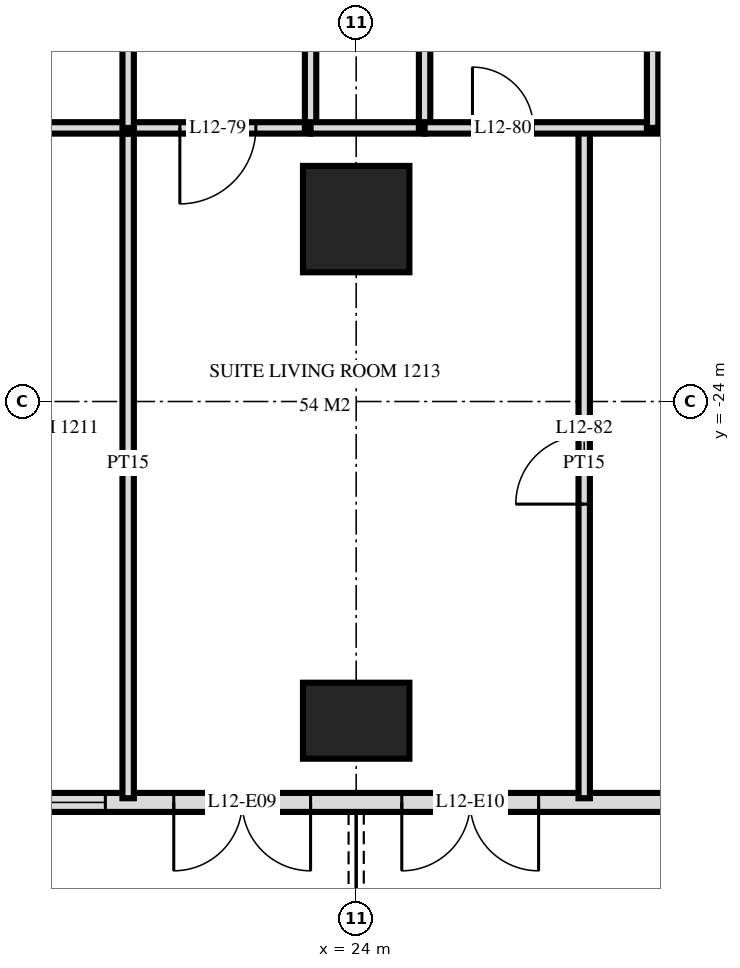
"""IFC4 building model, lengths in metres.
Left out: names, types, materials, properties, quantities, classifications, styles, units other than length and angle.
Written with IfcOpenShell. Run it as: python <this file> out.ifc"""

import sys

from ifc_helpers import new_model, si_unit, direction, frame, frame_2d, origin, origin_2d, place, context, subcontext, project, spatial, rectangle, extrude, element, fill, save


model = new_model("IFC4")
c1 = context("Model", 3, precision=1e-05, world=origin(), true_north=direction((0.0, 1.0)))
c2 = subcontext(c1, "Body", "Model", "MODEL_VIEW")
j1 = project(units=[si_unit("LENGTHUNIT", "METRE"), si_unit("PLANEANGLEUNIT", "RADIAN")], contexts=[c1])
p1 = place(None, origin())
s1 = spatial("IfcSite", under=j1, at=p1, CompositionType="ELEMENT")
p2 = place(p1, origin())
s2 = spatial("IfcBuilding", under=s1, at=p2, CompositionType="ELEMENT")
p3 = place(p2, frame((0.0, 0.0, 52.8)))
s3 = spatial("IfcBuildingStorey", under=s2, at=p3, CompositionType="ELEMENT", Elevation=52.8)
p4 = place(p3, frame((24.0, -28.2, 0.0), z_axis=(0.0, 0.0, 1.0), x_axis=(1.0, 0.0, 0.0)))
e1 = element("IfcColumn", 1, at=p4, inside=s3, PredefinedType="COLUMN", context=c2, shape_type="SweptSolid", body=[
    extrude(rectangle(XDim=1.4, YDim=1.0, at=origin_2d()), origin(), (0.0, 0.0, 1.0), 3.6),
])
p5 = place(p3, frame((24.0, -21.6, 0.0), z_axis=(0.0, 0.0, 1.0), x_axis=(1.0, 0.0, 0.0)))
e2 = element("IfcColumn", 2, at=p5, inside=s3, PredefinedType="COLUMN", context=c2, shape_type="SweptSolid", body=[
    extrude(rectangle(XDim=1.4, YDim=1.4, at=origin_2d()), origin(), (0.0, 0.0, 1.0), 3.6),
])
p6 = place(p3, frame((-28.775, -29.275, 0.0), z_axis=(0.0, 0.0, 1.0), x_axis=(1.0, 0.0, 0.0)))
e3 = element("IfcWall", 3, at=p6, inside=s3, PredefinedType="SOLIDWALL", context=c2, shape_type="SweptSolid", body=[
    extrude(rectangle(XDim=57.551, YDim=0.25, at=frame_2d((28.775, 0.0))), origin(), (0.0, 0.0, 1.0), 3.32),
])
p7 = place(p6, frame((0.575, 0.0, 0.0)))
e4 = element("IfcOpeningElement", 4, at=p7, cuts=e3, PredefinedType="OPENING", context=c2, shape_type="SweptSolid", body=[
    extrude(rectangle(XDim=1.8, YDim=2.4, at=frame_2d((0.9, 1.2))), frame((0.0, 0.135, 0.0), z_axis=(0.0, -1.0, 0.0), x_axis=(1.0, 0.0, 0.0)), (0.0, 0.0, 1.0), 0.27),
])
p8 = place(p6, frame((5.375, 0.0, 0.0)))
e5 = element("IfcOpeningElement", 5, at=p8, cuts=e3, PredefinedType="OPENING", context=c2, shape_type="SweptSolid", body=[
    extrude(rectangle(XDim=1.8, YDim=2.4, at=frame_2d((0.9, 1.2))), frame((0.0, 0.135, 0.0), z_axis=(0.0, -1.0, 0.0), x_axis=(1.0, 0.0, 0.0)), (0.0, 0.0, 1.0), 0.27),
])
p9 = place(p6, frame((8.075, 0.0, 0.3)))
e6 = element("IfcOpeningElement", 6, at=p9, cuts=e3, PredefinedType="OPENING", context=c2, shape_type="SweptSolid", body=[
    extrude(rectangle(XDim=2.4, YDim=2.1, at=frame_2d((1.2, 1.05))), frame((0.0, 0.135, 0.0), z_axis=(0.0, -1.0, 0.0), x_axis=(1.0, 0.0, 0.0)), (0.0, 0.0, 1.0), 0.27),
])
p10 = place(p6, frame((11.375, 0.0, 0.0)))
e7 = element("IfcOpeningElement", 7, at=p10, cuts=e3, PredefinedType="OPENING", context=c2, shape_type="SweptSolid", body=[
    extrude(rectangle(XDim=1.8, YDim=2.4, at=frame_2d((0.9, 1.2))), frame((0.0, 0.135, 0.0), z_axis=(0.0, -1.0, 0.0), x_axis=(1.0, 0.0, 0.0)), (0.0, 0.0, 1.0), 0.27),
])
p11 = place(p6, frame((14.075, 0.0, 0.3)))
e8 = element("IfcOpeningElement", 8, at=p11, cuts=e3, PredefinedType="OPENING", context=c2, shape_type="SweptSolid", body=[
    extrude(rectangle(XDim=2.4, YDim=2.1, at=frame_2d((1.2, 1.05))), frame((0.0, 0.135, 0.0), z_axis=(0.0, -1.0, 0.0), x_axis=(1.0, 0.0, 0.0)), (0.0, 0.0, 1.0), 0.27),
])
p12 = place(p6, frame((17.375, 0.0, 0.0)))
e9 = element("IfcOpeningElement", 9, at=p12, cuts=e3, PredefinedType="OPENING", context=c2, shape_type="SweptSolid", body=[
    extrude(rectangle(XDim=1.8, YDim=2.4, at=frame_2d((0.9, 1.2))), frame((0.0, 0.135, 0.0), z_axis=(0.0, -1.0, 0.0), x_axis=(1.0, 0.0, 0.0)), (0.0, 0.0, 1.0), 0.27),
])
p13 = place(p6, frame((20.075, 0.0, 0.3)))
e10 = element("IfcOpeningElement", 10, at=p13, cuts=e3, PredefinedType="OPENING", context=c2, shape_type="SweptSolid", body=[
    extrude(rectangle(XDim=2.4, YDim=2.1, at=frame_2d((1.2, 1.05))), frame((0.0, 0.135, 0.0), z_axis=(0.0, -1.0, 0.0), x_axis=(1.0, 0.0, 0.0)), (0.0, 0.0, 1.0), 0.27),
])
p14 = place(p6, frame((23.075, 0.0, 0.3)))
e11 = element("IfcOpeningElement", 11, at=p14, cuts=e3, PredefinedType="OPENING", context=c2, shape_type="SweptSolid", body=[
    extrude(rectangle(XDim=2.4, YDim=2.1, at=frame_2d((1.2, 1.05))), frame((0.0, 0.135, 0.0), z_axis=(0.0, -1.0, 0.0), x_axis=(1.0, 0.0, 0.0)), (0.0, 0.0, 1.0), 0.27),
])
p15 = place(p6, frame((26.375, 0.0, 0.0)))
e12 = element("IfcOpeningElement", 12, at=p15, cuts=e3, PredefinedType="OPENING", context=c2, shape_type="SweptSolid", body=[
    extrude(rectangle(XDim=1.8, YDim=2.4, at=frame_2d((0.9, 1.2))), frame((0.0, 0.135, 0.0), z_axis=(0.0, -1.0, 0.0), x_axis=(1.0, 0.0, 0.0)), (0.0, 0.0, 1.0), 0.27),
])
p16 = place(p6, frame((29.375, 0.0, 0.0)))
e13 = element("IfcOpeningElement", 13, at=p16, cuts=e3, PredefinedType="OPENING", context=c2, shape_type="SweptSolid", body=[
    extrude(rectangle(XDim=1.8, YDim=2.4, at=frame_2d((0.9, 1.2))), frame((0.0, 0.135, 0.0), z_axis=(0.0, -1.0, 0.0), x_axis=(1.0, 0.0, 0.0)), (0.0, 0.0, 1.0), 0.27),
])
p17 = place(p6, frame((32.075, 0.0, 0.3)))
e14 = element("IfcOpeningElement", 14, at=p17, cuts=e3, PredefinedType="OPENING", context=c2, shape_type="SweptSolid", body=[
    extrude(rectangle(XDim=2.4, YDim=2.1, at=frame_2d((1.2, 1.05))), frame((0.0, 0.135, 0.0), z_axis=(0.0, -1.0, 0.0), x_axis=(1.0, 0.0, 0.0)), (0.0, 0.0, 1.0), 0.27),
])
p18 = place(p6, frame((35.075, 0.0, 0.3)))
e15 = element("IfcOpeningElement", 15, at=p18, cuts=e3, PredefinedType="OPENING", context=c2, shape_type="SweptSolid", body=[
    extrude(rectangle(XDim=2.4, YDim=2.1, at=frame_2d((1.2, 1.05))), frame((0.0, 0.135, 0.0), z_axis=(0.0, -1.0, 0.0), x_axis=(1.0, 0.0, 0.0)), (0.0, 0.0, 1.0), 0.27),
])
p19 = place(p6, frame((38.375, 0.0, 0.0)))
e16 = element("IfcOpeningElement", 16, at=p19, cuts=e3, PredefinedType="OPENING", context=c2, shape_type="SweptSolid", body=[
    extrude(rectangle(XDim=1.8, YDim=2.4, at=frame_2d((0.9, 1.2))), frame((0.0, 0.135, 0.0), z_axis=(0.0, -1.0, 0.0), x_axis=(1.0, 0.0, 0.0)), (0.0, 0.0, 1.0), 0.27),
])
p20 = place(p6, frame((41.375, 0.0, 0.0)))
e17 = element("IfcOpeningElement", 17, at=p20, cuts=e3, PredefinedType="OPENING", context=c2, shape_type="SweptSolid", body=[
    extrude(rectangle(XDim=1.8, YDim=2.4, at=frame_2d((0.9, 1.2))), frame((0.0, 0.135, 0.0), z_axis=(0.0, -1.0, 0.0), x_axis=(1.0, 0.0, 0.0)), (0.0, 0.0, 1.0), 0.27),
])
p21 = place(p6, frame((44.075, 0.0, 0.3)))
e18 = element("IfcOpeningElement", 18, at=p21, cuts=e3, PredefinedType="OPENING", context=c2, shape_type="SweptSolid", body=[
    extrude(rectangle(XDim=2.4, YDim=2.1, at=frame_2d((1.2, 1.05))), frame((0.0, 0.135, 0.0), z_axis=(0.0, -1.0, 0.0), x_axis=(1.0, 0.0, 0.0)), (0.0, 0.0, 1.0), 0.27),
])
p22 = place(p6, frame((47.075, 0.0, 0.3)))
e19 = element("IfcOpeningElement", 19, at=p22, cuts=e3, PredefinedType="OPENING", context=c2, shape_type="SweptSolid", body=[
    extrude(rectangle(XDim=2.4, YDim=2.1, at=frame_2d((1.2, 1.05))), frame((0.0, 0.135, 0.0), z_axis=(0.0, -1.0, 0.0), x_axis=(1.0, 0.0, 0.0)), (0.0, 0.0, 1.0), 0.27),
])
p23 = place(p6, frame((50.375, 0.0, 0.0)))
e20 = element("IfcOpeningElement", 20, at=p23, cuts=e3, PredefinedType="OPENING", context=c2, shape_type="SweptSolid", body=[
    extrude(rectangle(XDim=1.8, YDim=2.4, at=frame_2d((0.9, 1.2))), frame((0.0, 0.135, 0.0), z_axis=(0.0, -1.0, 0.0), x_axis=(1.0, 0.0, 0.0)), (0.0, 0.0, 1.0), 0.27),
])
p24 = place(p6, frame((53.375, 0.0, 0.0)))
e21 = element("IfcOpeningElement", 21, at=p24, cuts=e3, PredefinedType="OPENING", context=c2, shape_type="SweptSolid", body=[
    extrude(rectangle(XDim=1.8, YDim=2.4, at=frame_2d((0.9, 1.2))), frame((0.0, 0.135, 0.0), z_axis=(0.0, -1.0, 0.0), x_axis=(1.0, 0.0, 0.0)), (0.0, 0.0, 1.0), 0.27),
])
p25 = place(p3, frame((27.9, -20.4, 0.0), z_axis=(0.0, 0.0, 1.0), x_axis=(0.0, 1.0, 0.0)))
e22 = element("IfcWall", 22, at=p25, inside=s3, PredefinedType="PARTITIONING", context=c2, shape_type="SweptSolid", body=[
    extrude(rectangle(XDim=3.0, YDim=0.15, at=frame_2d((1.5, 0.0))), origin(), (0.0, 0.0, 1.0), 3.32),
])
p26 = place(p3, frame((27.0, -29.22, 0.0), z_axis=(0.0, 0.0, 1.0), x_axis=(0.0, 1.0, 0.0)))
e23 = element("IfcWall", 23, at=p26, inside=s3, PredefinedType="PARTITIONING", context=c2, shape_type="SweptSolid", body=[
    extrude(rectangle(XDim=8.82, YDim=0.15, at=frame_2d((4.41, 0.0))), origin(), (0.0, 0.0, 1.0), 3.32),
])
p27 = place(p26, frame((3.87, 0.0, 0.0)))
e24 = element("IfcOpeningElement", 24, at=p27, cuts=e23, PredefinedType="OPENING", context=c2, shape_type="SweptSolid", body=[
    extrude(rectangle(XDim=0.9, YDim=2.1, at=frame_2d((0.45, 1.05))), frame((0.0, 0.085, 0.0), z_axis=(0.0, -1.0, 0.0), x_axis=(1.0, 0.0, 0.0)), (0.0, 0.0, 1.0), 0.17),
])
p28 = place(p3, frame((24.9, -20.4, 0.0), z_axis=(0.0, 0.0, 1.0), x_axis=(0.0, 1.0, 0.0)))
e25 = element("IfcWall", 25, at=p28, inside=s3, PredefinedType="PLUMBINGWALL", context=c2, shape_type="SweptSolid", body=[
    extrude(rectangle(XDim=3.0, YDim=0.15, at=frame_2d((1.5, 0.0))), origin(), (0.0, 0.0, 1.0), 3.32),
])
p29 = place(p3, frame((23.4, -20.4, 0.0), z_axis=(0.0, 0.0, 1.0), x_axis=(0.0, 1.0, 0.0)))
e26 = element("IfcWall", 26, at=p29, inside=s3, PredefinedType="PARTITIONING", context=c2, shape_type="SweptSolid", body=[
    extrude(rectangle(XDim=3.0, YDim=0.15, at=frame_2d((1.5, 0.0))), origin(), (0.0, 0.0, 1.0), 3.32),
])
p30 = place(p29, frame((1.02, 0.0, 0.0)))
e27 = element("IfcOpeningElement", 27, at=p30, cuts=e26, PredefinedType="OPENING", context=c2, shape_type="SweptSolid", body=[
    extrude(rectangle(XDim=1.0, YDim=2.1, at=frame_2d((0.5, 1.05))), frame((0.0, 0.085, 0.0), z_axis=(0.0, -1.0, 0.0), x_axis=(1.0, 0.0, 0.0)), (0.0, 0.0, 1.0), 0.17),
])
p31 = place(p3, frame((21.0, -20.4, 0.0), z_axis=(0.0, 0.0, 1.0), x_axis=(0.0, 1.0, 0.0)))
e28 = element("IfcWall", 28, at=p31, inside=s3, PredefinedType="PARTITIONING", context=c2, shape_type="SweptSolid", body=[
    extrude(rectangle(XDim=3.0, YDim=0.15, at=frame_2d((1.5, 0.0))), origin(), (0.0, 0.0, 1.0), 3.32),
])
p32 = place(p3, frame((21.0, -29.22, 0.0), z_axis=(0.0, 0.0, 1.0), x_axis=(0.0, 1.0, 0.0)))
e29 = element("IfcWall", 29, at=p32, inside=s3, PredefinedType="PARTITIONING", context=c2, shape_type="SweptSolid", body=[
    extrude(rectangle(XDim=8.82, YDim=0.15, at=frame_2d((4.41, 0.0))), origin(), (0.0, 0.0, 1.0), 3.32),
])
p33 = place(p3, frame((21.0, -20.4, 0.0), z_axis=(0.0, 0.0, 1.0), x_axis=(1.0, 0.0, 0.0)))
e30 = element("IfcWall", 30, at=p33, inside=s3, PredefinedType="PARTITIONING", context=c2, shape_type="SweptSolid", body=[
    extrude(rectangle(XDim=2.4, YDim=0.15, at=frame_2d((1.2, 0.0))), origin(), (0.0, 0.0, 1.0), 3.32),
])
p34 = place(p33, frame((0.68, 0.0, 0.0)))
e31 = element("IfcOpeningElement", 31, at=p34, cuts=e30, PredefinedType="OPENING", context=c2, shape_type="SweptSolid", body=[
    extrude(rectangle(XDim=1.0, YDim=2.1, at=frame_2d((0.5, 1.05))), frame((0.0, 0.085, 0.0), z_axis=(0.0, -1.0, 0.0), x_axis=(1.0, 0.0, 0.0)), (0.0, 0.0, 1.0), 0.17),
])
p35 = place(p3, frame((19.3, -20.4, 0.0), z_axis=(0.0, 0.0, 1.0), x_axis=(1.0, 0.0, 0.0)))
e32 = element("IfcWall", 32, at=p35, inside=s3, PredefinedType="PARTITIONING", context=c2, shape_type="SweptSolid", body=[
    extrude(rectangle(XDim=1.7, YDim=0.15, at=frame_2d((0.85, 0.0))), origin(), (0.0, 0.0, 1.0), 3.32),
])
p36 = place(p3, frame((24.9, -20.4, 0.0), z_axis=(0.0, 0.0, 1.0), x_axis=(1.0, 0.0, 0.0)))
e33 = element("IfcWall", 33, at=p36, inside=s3, PredefinedType="PARTITIONING", context=c2, shape_type="SweptSolid", body=[
    extrude(rectangle(XDim=8.22, YDim=0.15, at=frame_2d((4.11, 0.0))), origin(), (0.0, 0.0, 1.0), 3.32),
])
p37 = place(p36, frame((0.63, 0.0, 0.0)))
e34 = element("IfcOpeningElement", 34, at=p37, cuts=e33, PredefinedType="OPENING", context=c2, shape_type="SweptSolid", body=[
    extrude(rectangle(XDim=0.8, YDim=2.1, at=frame_2d((0.4, 1.05))), frame((0.0, 0.085, 0.0), z_axis=(0.0, -1.0, 0.0), x_axis=(1.0, 0.0, 0.0)), (0.0, 0.0, 1.0), 0.17),
])
p38 = place(p36, frame((3.48, 0.0, 0.0)))
e35 = element("IfcOpeningElement", 35, at=p38, cuts=e33, PredefinedType="OPENING", context=c2, shape_type="SweptSolid", body=[
    extrude(rectangle(XDim=0.9, YDim=2.1, at=frame_2d((0.45, 1.05))), frame((0.0, 0.085, 0.0), z_axis=(0.0, -1.0, 0.0), x_axis=(1.0, 0.0, 0.0)), (0.0, 0.0, 1.0), 0.17),
])
p39 = place(p3, frame((23.4, -20.4, 0.0), z_axis=(0.0, 0.0, 1.0), x_axis=(1.0, 0.0, 0.0)))
e36 = element("IfcWall", 36, at=p39, inside=s3, PredefinedType="PLUMBINGWALL", context=c2, shape_type="SweptSolid", body=[
    extrude(rectangle(XDim=1.5, YDim=0.15, at=frame_2d((0.75, 0.0))), origin(), (0.0, 0.0, 1.0), 3.32),
])
p40 = place(p22, origin())
e37 = element("IfcWindow", 37, at=p40, inside=s3, PartitioningType="SINGLE_PANEL", PredefinedType="WINDOW", context=c2, shape_type="SweptSolid", body=[
    extrude(rectangle(XDim=2.4, YDim=2.1, at=frame_2d((1.2, 1.05))), frame((0.0, 0.03, 0.0), z_axis=(0.0, -1.0, 0.0), x_axis=(1.0, 0.0, 0.0)), (0.0, 0.0, 1.0), 0.06),
])
fill(e19, e37)
p41 = place(p23, frame((0.9, 0.0, 0.0), z_axis=(0.0, 0.0, 1.0), x_axis=(-1.0, 0.0, 0.0)))
e38 = element("IfcDoor", 38, at=p41, inside=s3, OperationType="DOUBLE_DOOR_SINGLE_SWING", PredefinedType="DOOR", context=c2, shape_type="SweptSolid", body=[
    extrude(rectangle(XDim=1.8, YDim=2.4, at=frame_2d((0.0, 1.2))), frame((0.0, -0.025, 0.0), z_axis=(0.0, 1.0, 0.0), x_axis=(-1.0, 0.0, 0.0)), (0.0, 0.0, 1.0), 0.05),
])
fill(e20, e38)
p42 = place(p24, frame((0.9, 0.0, 0.0), z_axis=(0.0, 0.0, 1.0), x_axis=(-1.0, 0.0, 0.0)))
e39 = element("IfcDoor", 39, at=p42, inside=s3, OperationType="DOUBLE_DOOR_SINGLE_SWING", PredefinedType="DOOR", context=c2, shape_type="SweptSolid", body=[
    extrude(rectangle(XDim=1.8, YDim=2.4, at=frame_2d((0.0, 1.2))), frame((0.0, -0.025, 0.0), z_axis=(0.0, 1.0, 0.0), x_axis=(-1.0, 0.0, 0.0)), (0.0, 0.0, 1.0), 0.05),
])
fill(e21, e39)
p43 = place(p34, frame((0.5, 0.0, 0.0), z_axis=(0.0, 0.0, 1.0), x_axis=(-1.0, 0.0, 0.0)))
e40 = element("IfcDoor", 40, at=p43, inside=s3, OperationType="SINGLE_SWING_LEFT", PredefinedType="DOOR", context=c2, shape_type="SweptSolid", body=[
    extrude(rectangle(XDim=1.0, YDim=2.1, at=frame_2d((0.0, 1.05))), frame((0.0, -0.025, 0.0), z_axis=(0.0, 1.0, 0.0), x_axis=(-1.0, 0.0, 0.0)), (0.0, 0.0, 1.0), 0.05),
])
fill(e31, e40)
p44 = place(p37, origin())
e41 = element("IfcDoor", 41, at=p44, inside=s3, OperationType="SINGLE_SWING_RIGHT", PredefinedType="DOOR", context=c2, shape_type="SweptSolid", body=[
    extrude(rectangle(XDim=0.8, YDim=2.1, at=frame_2d((0.4, 1.05))), frame((0.0, 0.025, 0.0), z_axis=(0.0, -1.0, 0.0), x_axis=(1.0, 0.0, 0.0)), (0.0, 0.0, 1.0), 0.05),
])
fill(e34, e41)
p45 = place(p27, origin())
e42 = element("IfcDoor", 42, at=p45, inside=s3, OperationType="SINGLE_SWING_RIGHT", PredefinedType="DOOR", context=c2, shape_type="SweptSolid", body=[
    extrude(rectangle(XDim=0.9, YDim=2.1, at=frame_2d((0.45, 1.05))), frame((0.0, 0.025, 0.0), z_axis=(0.0, -1.0, 0.0), x_axis=(1.0, 0.0, 0.0)), (0.0, 0.0, 1.0), 0.05),
])
fill(e24, e42)
save(model, sys.argv[1])
